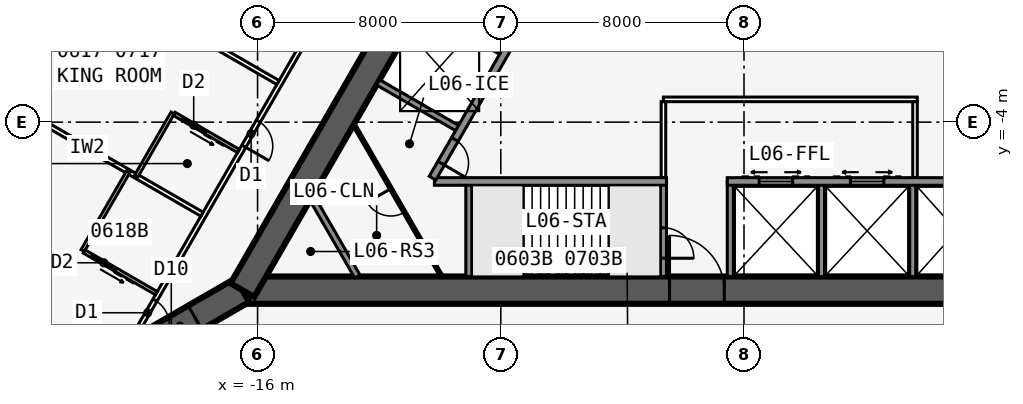
"""IFC4 building model, lengths in metres.
Left out: names, types, materials, properties, quantities, classifications, styles, units other than length and angle.
Written with IfcOpenShell. Run it as: python <this file> out.ifc"""

import sys

from ifc_helpers import new_model, si_unit, direction, frame, frame_2d, origin, place, context, subcontext, project, spatial, rectangle, extrude, element, fill, save


model = new_model("IFC4")
c1 = context("Model", 3, precision=1e-05, world=origin(), true_north=direction((0.0, 1.0)))
c2 = subcontext(c1, "Body", "Model", "MODEL_VIEW")
j1 = project(units=[si_unit("LENGTHUNIT", "METRE"), si_unit("PLANEANGLEUNIT", "RADIAN")], contexts=[c1])
p1 = place(None, origin())
s1 = spatial("IfcSite", under=j1, at=p1, CompositionType="ELEMENT")
p2 = place(p1, origin())
s2 = spatial("IfcBuilding", under=s1, at=p2, CompositionType="ELEMENT")
p3 = place(p2, frame((0.0, 0.0, 31.9)))
s3 = spatial("IfcBuildingStorey", under=s2, at=p3, CompositionType="ELEMENT", Elevation=31.9)
p4 = place(p3, frame((-16.5, -9.526, 0.0), z_axis=(0.0, 0.0, 1.0), x_axis=(1.0, 0.0, 0.0)))
e1 = element("IfcWall", 1, at=p4, inside=s3, PredefinedType="SHEAR", context=c2, shape_type="SweptSolid", body=[
    extrude(rectangle(XDim=33.0, YDim=0.9, at=frame_2d((16.5, 0.0))), origin(), (0.0, 0.0, 1.0), 3.4),
])
p5 = place(p4, frame((14.05, 0.0, 0.0)))
e2 = element("IfcOpeningElement", 2, at=p5, cuts=e1, PredefinedType="OPENING", context=c2, shape_type="SweptSolid", body=[
    extrude(rectangle(XDim=1.8, YDim=2.13, at=frame_2d((0.9, 1.065))), frame((0.0, 0.46, 0.0), z_axis=(0.0, -1.0, 0.0), x_axis=(1.0, 0.0, 0.0)), (0.0, 0.0, 1.0), 0.92),
])
p6 = place(p3, frame((-10.183, -5.951, 0.0), z_axis=(0.0, 0.0, 1.0), x_axis=(1.0, 0.0, 0.0)))
e3 = element("IfcWall", 3, at=p6, inside=s3, PredefinedType="SOLIDWALL", context=c2, shape_type="SweptSolid", body=[
    extrude(rectangle(XDim=7.633, YDim=0.25, at=frame_2d((3.816, 0.0))), origin(), (0.0, 0.0, 1.0), 3.235),
])
p7 = place(p3, frame((-0.55, -5.951, 0.0), z_axis=(0.0, 0.0, 1.0), x_axis=(1.0, 0.0, 0.0)))
e4 = element("IfcWall", 4, at=p7, inside=s3, PredefinedType="SOLIDWALL", context=c2, shape_type="SweptSolid", body=[
    extrude(rectangle(XDim=10.733, YDim=0.25, at=frame_2d((5.366, 0.0))), origin(), (0.0, 0.0, 1.0), 3.235),
])
p8 = place(p7, frame((9.314, 0.0, 0.0)))
e5 = element("IfcOpeningElement", 5, at=p8, cuts=e4, PredefinedType="OPENING", context=c2, shape_type="SweptSolid", body=[
    extrude(rectangle(XDim=0.9, YDim=2.13, at=frame_2d((0.45, 1.065))), frame((0.0, 0.135, 0.0), z_axis=(0.0, -1.0, 0.0), x_axis=(1.0, 0.0, 0.0)), (0.0, 0.0, 1.0), 0.27),
])
p9 = place(p7, frame((1.05, 0.0, 0.0)))
e6 = element("IfcOpeningElement", 6, at=p9, cuts=e4, PredefinedType="OPENING", context=c2, shape_type="SweptSolid", body=[
    extrude(rectangle(XDim=1.1, YDim=2.13, at=frame_2d((0.55, 1.065))), frame((0.0, 0.135, 0.0), z_axis=(0.0, -1.0, 0.0), x_axis=(1.0, 0.0, 0.0)), (0.0, 0.0, 1.0), 0.27),
])
p10 = place(p7, frame((4.05, 0.0, 0.0)))
e7 = element("IfcOpeningElement", 7, at=p10, cuts=e4, PredefinedType="OPENING", context=c2, shape_type="SweptSolid", body=[
    extrude(rectangle(XDim=1.1, YDim=2.13, at=frame_2d((0.55, 1.065))), frame((0.0, 0.135, 0.0), z_axis=(0.0, -1.0, 0.0), x_axis=(1.0, 0.0, 0.0)), (0.0, 0.0, 1.0), 0.27),
])
p11 = place(p3, frame((-9.05, -5.951, 0.0), z_axis=(0.0, 0.0, 1.0), x_axis=(0.0, -1.0, 0.0)))
e8 = element("IfcWall", 8, at=p11, inside=s3, PredefinedType="SOLIDWALL", context=c2, shape_type="SweptSolid", body=[
    extrude(rectangle(XDim=3.125, YDim=0.2, at=frame_2d((1.562, 0.0))), origin(), (0.0, 0.0, 1.0), 3.235),
])
p12 = place(p3, frame((-2.65, -5.951, 0.0), z_axis=(0.0, 0.0, 1.0), x_axis=(0.0, -1.0, 0.0)))
e9 = element("IfcWall", 9, at=p12, inside=s3, PredefinedType="SOLIDWALL", context=c2, shape_type="SweptSolid", body=[
    extrude(rectangle(XDim=3.125, YDim=0.2, at=frame_2d((1.562, 0.0))), origin(), (0.0, 0.0, 1.0), 3.235),
])
p13 = place(p12, frame((1.525, 0.0, 0.0)))
e10 = element("IfcOpeningElement", 10, at=p13, cuts=e9, PredefinedType="OPENING", context=c2, shape_type="SweptSolid", body=[
    extrude(rectangle(XDim=1.0, YDim=2.13, at=frame_2d((0.5, 1.065))), frame((0.0, 0.11, 0.0), z_axis=(0.0, -1.0, 0.0), x_axis=(1.0, 0.0, 0.0)), (0.0, 0.0, 1.0), 0.22),
])
for number, where, z_axis, x_axis in (
    (11, (-0.45, -5.951, 0.0), (0.0, 0.0, 1.0), (0.0, -1.0, 0.0)),
    (12, (2.55, -5.951, 0.0), (0.0, 0.0, 1.0), (0.0, -1.0, 0.0)),
    (13, (5.55, -5.951, 0.0), (0.0, 0.0, 1.0), (0.0, -1.0, 0.0)),
):
    element("IfcWall", number, at=place(p3, frame(where, z_axis=z_axis, x_axis=x_axis)), inside=s3, PredefinedType="SOLIDWALL", context=c2, shape_type="SweptSolid", body=[
        extrude(rectangle(XDim=3.125, YDim=0.2, at=frame_2d((1.562, 0.0))), origin(), (0.0, 0.0, 1.0), 3.235),
    ])
p14 = place(p3, frame((16.5, -9.526, 0.0), z_axis=(0.0, 0.0, 1.0), x_axis=(-0.499999749417, 0.866025548458, 0.0)))
e14 = element("IfcWall", 14, at=p14, inside=s3, PredefinedType="SHEAR", context=c2, shape_type="SweptSolid", body=[
    extrude(rectangle(XDim=33.0, YDim=0.9, at=frame_2d((16.5, 0.0))), origin(), (0.0, 0.0, 1.0), 3.4),
])
p15 = place(p14, frame((14.15, 0.0, 0.0)))
e15 = element("IfcOpeningElement", 15, at=p15, cuts=e14, PredefinedType="OPENING", context=c2, shape_type="SweptSolid", body=[
    extrude(rectangle(XDim=1.8, YDim=2.13, at=frame_2d((0.9, 1.065))), frame((0.0, 0.46, 0.0), z_axis=(0.0, -1.0, 0.0), x_axis=(1.0, 0.0, 0.0)), (0.0, 0.0, 1.0), 0.92),
])
p16 = place(p14, frame((12.6, 0.0, 0.0)))
e16 = element("IfcOpeningElement", 16, at=p16, cuts=e14, PredefinedType="OPENING", context=c2, shape_type="SweptSolid", body=[
    extrude(rectangle(XDim=1.0, YDim=2.13, at=frame_2d((0.5, 1.065))), frame((0.0, 0.46, 0.0), z_axis=(0.0, -1.0, 0.0), x_axis=(1.0, 0.0, 0.0)), (0.0, 0.0, 1.0), 0.92),
])
p17 = place(p3, frame((10.245, -5.843, 0.0), z_axis=(0.0, 0.0, 1.0), x_axis=(-0.499993009313, 0.866029439822, 0.0)))
e17 = element("IfcWall", 17, at=p17, inside=s3, PredefinedType="SOLIDWALL", context=c2, shape_type="SweptSolid", body=[
    extrude(rectangle(XDim=7.733, YDim=0.25, at=frame_2d((3.866, 0.0))), origin(), (0.0, 0.0, 1.0), 3.235),
])
p18 = place(p3, frame((0.0, 19.052, 0.0), z_axis=(0.0, 0.0, 1.0), x_axis=(-0.499999749417, -0.866025548458, 0.0)))
e18 = element("IfcWall", 18, at=p18, inside=s3, PredefinedType="SHEAR", context=c2, shape_type="SweptSolid", body=[
    extrude(rectangle(XDim=33.0, YDim=0.9, at=frame_2d((16.5, 0.0))), origin(), (0.0, 0.0, 1.0), 3.4),
])
p19 = place(p18, frame((14.15, 0.0, 0.0)))
e19 = element("IfcOpeningElement", 19, at=p19, cuts=e18, PredefinedType="OPENING", context=c2, shape_type="SweptSolid", body=[
    extrude(rectangle(XDim=1.8, YDim=2.13, at=frame_2d((0.9, 1.065))), frame((0.0, 0.46, 0.0), z_axis=(0.0, -1.0, 0.0), x_axis=(1.0, 0.0, 0.0)), (0.0, 0.0, 1.0), 0.92),
])
p20 = place(p18, frame((12.6, 0.0, 0.0)))
e20 = element("IfcOpeningElement", 20, at=p20, cuts=e18, PredefinedType="OPENING", context=c2, shape_type="SweptSolid", body=[
    extrude(rectangle(XDim=1.0, YDim=2.13, at=frame_2d((0.5, 1.065))), frame((0.0, 0.46, 0.0), z_axis=(0.0, -1.0, 0.0), x_axis=(1.0, 0.0, 0.0)), (0.0, 0.0, 1.0), 0.92),
])
p21 = place(p3, frame((-4.929, 3.365, 0.0), z_axis=(0.0, 0.0, 1.0), x_axis=(-0.499991433582, -0.866030349552, 0.0)))
e21 = element("IfcWall", 21, at=p21, inside=s3, PredefinedType="SOLIDWALL", context=c2, shape_type="SweptSolid", body=[
    extrude(rectangle(XDim=10.633, YDim=0.25, at=frame_2d((5.316, 0.0))), origin(), (0.0, 0.0, 1.0), 3.235),
])
p22 = place(p21, frame((9.164, 0.0, 0.0)))
e22 = element("IfcOpeningElement", 22, at=p22, cuts=e21, PredefinedType="OPENING", context=c2, shape_type="SweptSolid", body=[
    extrude(rectangle(XDim=0.9, YDim=2.13, at=frame_2d((0.45, 1.065))), frame((0.0, 0.135, 0.0), z_axis=(0.0, -1.0, 0.0), x_axis=(1.0, 0.0, 0.0)), (0.0, 0.0, 1.0), 0.27),
])
for number, where, z_axis, x_axis in (
    (23, (-7.879, -1.744, 0.0), (0.0, 0.0, 1.0), (-0.866, 0.5, 0.0)),
    (24, (-9.329, -4.256, 0.0), (0.0, 0.0, 1.0), (-0.866, 0.5, 0.0)),
):
    element("IfcWall", number, at=place(p3, frame(where, z_axis=z_axis, x_axis=x_axis)), inside=s3, PredefinedType="SOLIDWALL", context=c2, shape_type="SweptSolid", body=[
        extrude(rectangle(XDim=3.125, YDim=0.2, at=frame_2d((1.562, 0.0))), origin(), (0.0, 0.0, 1.0), 3.235),
    ])
p23 = place(p3, frame((-16.5, -9.526, 0.0), z_axis=(0.0, 0.0, 1.0), x_axis=(-0.866031398331, -0.499989616998, 0.0)))
e25 = element("IfcWall", 25, at=p23, inside=s3, PredefinedType="SHEAR", context=c2, shape_type="SweptSolid", body=[
    extrude(rectangle(XDim=4.746, YDim=0.9, at=frame_2d((2.373, 0.0))), origin(), (0.0, 0.0, 1.0), 3.4),
])
p24 = place(p23, frame((1.8, 0.0, 0.0)))
e26 = element("IfcOpeningElement", 26, at=p24, cuts=e25, PredefinedType="OPENING", context=c2, shape_type="SweptSolid", body=[
    extrude(rectangle(XDim=1.8, YDim=2.13, at=frame_2d((0.9, 1.065))), frame((0.0, 0.46, 0.0), z_axis=(0.0, -1.0, 0.0), x_axis=(1.0, 0.0, 0.0)), (0.0, 0.0, 1.0), 0.92),
])
p25 = place(p3, frame((20.027, -10.985, 0.0), z_axis=(0.0, 0.0, 1.0), x_axis=(-0.500001677587, 0.866024435227, 0.0)))
e27 = element("IfcWall", 27, at=p25, inside=s3, PredefinedType="PARTITIONING", context=c2, shape_type="SweptSolid", body=[
    extrude(rectangle(XDim=39.054, YDim=0.15, at=frame_2d((19.527, 0.0))), origin(), (0.0, 0.0, 1.0), 3.235),
])
p26 = place(p25, frame((0.352, 0.0, 0.0)))
e28 = element("IfcOpeningElement", 28, at=p26, cuts=e27, PredefinedType="OPENING", context=c2, shape_type="SweptSolid", body=[
    extrude(rectangle(XDim=0.95, YDim=2.13, at=frame_2d((0.475, 1.065))), frame((0.0, 0.085, 0.0), z_axis=(0.0, -1.0, 0.0), x_axis=(1.0, 0.0, 0.0)), (0.0, 0.0, 1.0), 0.17),
])
p27 = place(p25, frame((5.952, 0.0, 0.0)))
e29 = element("IfcOpeningElement", 29, at=p27, cuts=e27, PredefinedType="OPENING", context=c2, shape_type="SweptSolid", body=[
    extrude(rectangle(XDim=0.95, YDim=2.13, at=frame_2d((0.475, 1.065))), frame((0.0, 0.085, 0.0), z_axis=(0.0, -1.0, 0.0), x_axis=(1.0, 0.0, 0.0)), (0.0, 0.0, 1.0), 0.17),
])
p28 = place(p25, frame((12.152, 0.0, 0.0)))
e30 = element("IfcOpeningElement", 30, at=p28, cuts=e27, PredefinedType="OPENING", context=c2, shape_type="SweptSolid", body=[
    extrude(rectangle(XDim=0.95, YDim=2.13, at=frame_2d((0.475, 1.065))), frame((0.0, 0.085, 0.0), z_axis=(0.0, -1.0, 0.0), x_axis=(1.0, 0.0, 0.0)), (0.0, 0.0, 1.0), 0.17),
])
p29 = place(p25, frame((15.952, 0.0, 0.0)))
e31 = element("IfcOpeningElement", 31, at=p29, cuts=e27, PredefinedType="OPENING", context=c2, shape_type="SweptSolid", body=[
    extrude(rectangle(XDim=0.95, YDim=2.13, at=frame_2d((0.475, 1.065))), frame((0.0, 0.085, 0.0), z_axis=(0.0, -1.0, 0.0), x_axis=(1.0, 0.0, 0.0)), (0.0, 0.0, 1.0), 0.17),
])
p30 = place(p25, frame((22.152, 0.0, 0.0)))
e32 = element("IfcOpeningElement", 32, at=p30, cuts=e27, PredefinedType="OPENING", context=c2, shape_type="SweptSolid", body=[
    extrude(rectangle(XDim=0.95, YDim=2.13, at=frame_2d((0.475, 1.065))), frame((0.0, 0.085, 0.0), z_axis=(0.0, -1.0, 0.0), x_axis=(1.0, 0.0, 0.0)), (0.0, 0.0, 1.0), 0.17),
])
p31 = place(p25, frame((25.952, 0.0, 0.0)))
e33 = element("IfcOpeningElement", 33, at=p31, cuts=e27, PredefinedType="OPENING", context=c2, shape_type="SweptSolid", body=[
    extrude(rectangle(XDim=0.95, YDim=2.13, at=frame_2d((0.475, 1.065))), frame((0.0, 0.085, 0.0), z_axis=(0.0, -1.0, 0.0), x_axis=(1.0, 0.0, 0.0)), (0.0, 0.0, 1.0), 0.17),
])
p32 = place(p25, frame((36.546, 0.0, 0.0)))
e34 = element("IfcOpeningElement", 34, at=p32, cuts=e27, PredefinedType="OPENING", context=c2, shape_type="SweptSolid", body=[
    extrude(rectangle(XDim=0.95, YDim=2.13, at=frame_2d((0.475, 1.065))), frame((0.0, 0.085, 0.0), z_axis=(0.0, -1.0, 0.0), x_axis=(1.0, 0.0, 0.0)), (0.0, 0.0, 1.0), 0.17),
])
p33 = place(p3, frame((-0.5, 22.836, 0.0), z_axis=(0.0, 0.0, 1.0), x_axis=(-0.500001677587, -0.866024435227, 0.0)))
e35 = element("IfcWall", 35, at=p33, inside=s3, PredefinedType="PARTITIONING", context=c2, shape_type="SweptSolid", body=[
    extrude(rectangle(XDim=39.054, YDim=0.15, at=frame_2d((19.527, 0.0))), origin(), (0.0, 0.0, 1.0), 3.235),
])
p34 = place(p33, frame((1.558, 0.0, 0.0)))
e36 = element("IfcOpeningElement", 36, at=p34, cuts=e35, PredefinedType="OPENING", context=c2, shape_type="SweptSolid", body=[
    extrude(rectangle(XDim=0.95, YDim=2.13, at=frame_2d((0.475, 1.065))), frame((0.0, 0.085, 0.0), z_axis=(0.0, -1.0, 0.0), x_axis=(1.0, 0.0, 0.0)), (0.0, 0.0, 1.0), 0.17),
])
p35 = place(p33, frame((15.352, 0.0, 0.0)))
e37 = element("IfcOpeningElement", 37, at=p35, cuts=e35, PredefinedType="OPENING", context=c2, shape_type="SweptSolid", body=[
    extrude(rectangle(XDim=0.95, YDim=2.13, at=frame_2d((0.475, 1.065))), frame((0.0, 0.085, 0.0), z_axis=(0.0, -1.0, 0.0), x_axis=(1.0, 0.0, 0.0)), (0.0, 0.0, 1.0), 0.17),
])
p36 = place(p33, frame((22.752, 0.0, 0.0)))
e38 = element("IfcOpeningElement", 38, at=p36, cuts=e35, PredefinedType="OPENING", context=c2, shape_type="SweptSolid", body=[
    extrude(rectangle(XDim=0.95, YDim=2.13, at=frame_2d((0.475, 1.065))), frame((0.0, 0.085, 0.0), z_axis=(0.0, -1.0, 0.0), x_axis=(1.0, 0.0, 0.0)), (0.0, 0.0, 1.0), 0.17),
])
p37 = place(p33, frame((30.952, 0.0, 0.0)))
e39 = element("IfcOpeningElement", 39, at=p37, cuts=e35, PredefinedType="OPENING", context=c2, shape_type="SweptSolid", body=[
    extrude(rectangle(XDim=0.95, YDim=2.13, at=frame_2d((0.475, 1.065))), frame((0.0, 0.085, 0.0), z_axis=(0.0, -1.0, 0.0), x_axis=(1.0, 0.0, 0.0)), (0.0, 0.0, 1.0), 0.17),
])
p38 = place(p33, frame((37.752, 0.0, 0.0)))
e40 = element("IfcOpeningElement", 40, at=p38, cuts=e35, PredefinedType="OPENING", context=c2, shape_type="SweptSolid", body=[
    extrude(rectangle(XDim=0.95, YDim=2.13, at=frame_2d((0.475, 1.065))), frame((0.0, 0.085, 0.0), z_axis=(0.0, -1.0, 0.0), x_axis=(1.0, 0.0, 0.0)), (0.0, 0.0, 1.0), 0.17),
])
p39 = place(p3, frame((-15.329, -2.697, 0.0), z_axis=(0.0, 0.0, 1.0), x_axis=(-0.866018409083, 0.500012114982, 0.0)))
e41 = element("IfcWall", 41, at=p39, inside=s3, PredefinedType="PARTITIONING", context=c2, shape_type="SweptSolid", body=[
    extrude(rectangle(XDim=9.485, YDim=0.15, at=frame_2d((4.742, 0.0))), origin(), (0.0, 0.0, 1.0), 2.389),
])
p40 = place(p3, frame((-17.829, -7.027, 0.0), z_axis=(0.0, 0.0, 1.0), x_axis=(-0.866032659912, 0.499987431809, 0.0)))
e42 = element("IfcWall", 42, at=p40, inside=s3, PredefinedType="PARTITIONING", context=c2, shape_type="SweptSolid", body=[
    extrude(rectangle(XDim=8.72, YDim=0.15, at=frame_2d((4.36, 0.0))), origin(), (0.0, 0.0, 1.0), 2.389),
])
p41 = place(p3, frame((-18.793, -3.699, 0.0), z_axis=(0.0, 0.0, 1.0), x_axis=(-0.500001309137, -0.866024647952, 0.0)))
e43 = element("IfcWall", 43, at=p41, inside=s3, PredefinedType="PLUMBINGWALL", context=c2, shape_type="SweptSolid", body=[
    extrude(rectangle(XDim=2.4, YDim=0.12, at=frame_2d((1.2, 0.0))), origin(), (0.0, 0.0, 1.0), 3.235),
])
p42 = place(p3, frame((-16.628, -4.949, 0.0), z_axis=(0.0, 0.0, 1.0), x_axis=(-0.866048967903, 0.499959183527, 0.0)))
e44 = element("IfcWall", 44, at=p42, inside=s3, PredefinedType="PLUMBINGWALL", context=c2, shape_type="SweptSolid", body=[
    extrude(rectangle(XDim=2.44, YDim=0.12, at=frame_2d((1.22, 0.0))), origin(), (0.0, 0.0, 1.0), 3.235),
])
p43 = place(p42, frame((1.25, 0.0, 0.0)))
e45 = element("IfcOpeningElement", 45, at=p43, cuts=e44, PredefinedType="OPENING", context=c2, shape_type="SweptSolid", body=[
    extrude(rectangle(XDim=0.9, YDim=2.13, at=frame_2d((0.45, 1.065))), frame((0.0, 0.07, 0.0), z_axis=(0.0, -1.0, 0.0), x_axis=(1.0, 0.0, 0.0)), (0.0, 0.0, 1.0), 0.14),
])
p44 = place(p3, frame((-20.253, -5.627, 0.0), z_axis=(0.0, 0.0, 1.0), x_axis=(-0.499990139034, -0.866031096941, 0.0)))
e46 = element("IfcWall", 46, at=p44, inside=s3, PredefinedType="PLUMBINGWALL", context=c2, shape_type="SweptSolid", body=[
    extrude(rectangle(XDim=3.0, YDim=0.12, at=frame_2d((1.5, 0.0))), origin(), (0.0, 0.0, 1.0), 3.235),
])
p45 = place(p3, frame((-19.329, -9.625, 0.0), z_axis=(0.0, 0.0, 1.0), x_axis=(-0.866035715982, 0.499982138324, 0.0)))
e47 = element("IfcWall", 47, at=p45, inside=s3, PredefinedType="PLUMBINGWALL", context=c2, shape_type="SweptSolid", body=[
    extrude(rectangle(XDim=2.74, YDim=0.12, at=frame_2d((1.37, 0.0))), origin(), (0.0, 0.0, 1.0), 3.235),
])
p46 = place(p45, frame((1.55, 0.0, 0.0)))
e48 = element("IfcOpeningElement", 48, at=p46, cuts=e47, PredefinedType="OPENING", context=c2, shape_type="SweptSolid", body=[
    extrude(rectangle(XDim=0.9, YDim=2.13, at=frame_2d((0.45, 1.065))), frame((0.0, 0.07, 0.0), z_axis=(0.0, -1.0, 0.0), x_axis=(1.0, 0.0, 0.0)), (0.0, 0.0, 1.0), 0.14),
])
p47 = place(p3, frame((-2.65, -3.251, 0.0), z_axis=(0.0, 0.0, 1.0), x_axis=(1.0, 0.0, 0.0)))
e49 = element("IfcWall", 49, at=p47, inside=s3, PredefinedType="PARTITIONING", context=c2, shape_type="SweptSolid", body=[
    extrude(rectangle(XDim=8.35, YDim=0.15, at=frame_2d((4.175, 0.0))), origin(), (0.0, 0.0, 1.0), 3.235),
])
for number, where, z_axis, x_axis in (
    (50, (-2.65, -5.826, 0.0), (0.0, 0.0, 1.0), (0.0, 1.0, 0.0)),
    (51, (5.625, -5.826, 0.0), (0.0, 0.0, 1.0), (0.0, 1.0, 0.0)),
):
    element("IfcWall", number, at=place(p3, frame(where, z_axis=z_axis, x_axis=x_axis)), inside=s3, PredefinedType="PARTITIONING", context=c2, shape_type="SweptSolid", body=[
        extrude(rectangle(XDim=2.5, YDim=0.15, at=frame_2d((1.25, 0.0))), origin(), (0.0, 0.0, 1.0), 3.235),
    ])
p48 = place(p3, frame((-12.719, -9.076, 0.0), z_axis=(0.0, 0.0, 1.0), x_axis=(-0.499952404951, 0.866052881055, 0.0)))
e52 = element("IfcWall", 52, at=p48, inside=s3, PredefinedType="SOLIDWALL", context=c2, shape_type="SweptSolid", body=[
    extrude(rectangle(XDim=3.002, YDim=0.2, at=frame_2d((1.501, 0.0))), origin(), (0.0, 0.0, 1.0), 3.235),
])
p49 = place(p3, frame((-9.947, -9.076, 0.0), z_axis=(0.0, 0.0, 1.0), x_axis=(-0.500027479704, 0.866009537788, 0.0)))
e53 = element("IfcWall", 53, at=p49, inside=s3, PredefinedType="PARTITIONING", context=c2, shape_type="SweptSolid", body=[
    extrude(rectangle(XDim=5.774, YDim=0.1, at=frame_2d((2.887, 0.0))), origin(), (0.0, 0.0, 1.0), 3.235),
])
p50 = place(p49, frame((2.437, 0.0, 0.0)))
e54 = element("IfcOpeningElement", 54, at=p50, cuts=e53, PredefinedType="OPENING", context=c2, shape_type="SweptSolid", body=[
    extrude(rectangle(XDim=0.9, YDim=2.13, at=frame_2d((0.45, 1.065))), frame((0.0, 0.06, 0.0), z_axis=(0.0, -1.0, 0.0), x_axis=(1.0, 0.0, 0.0)), (0.0, 0.0, 1.0), 0.12),
])
p51 = place(p3, frame((-7.247, -7.576, 0.0), z_axis=(0.0, 0.0, 1.0), x_axis=(1.0, 0.0, 0.0)))
e55 = element("IfcWall", 55, at=p51, inside=s3, PredefinedType="SOLIDWALL", context=c2, shape_type="SweptSolid", body=[
    extrude(rectangle(XDim=2.794, YDim=0.1, at=frame_2d((1.397, 0.0))), origin(), (0.0, 0.0, 1.0), 3.4),
])
p52 = place(p43, origin())
e56 = element("IfcDoor", 56, at=p52, inside=s3, OperationType="SLIDING_TO_LEFT", PredefinedType="DOOR", context=c2, shape_type="SweptSolid", body=[
    extrude(rectangle(XDim=0.9, YDim=2.13, at=frame_2d((0.45, 1.065))), frame((0.0, 0.025, 0.0), z_axis=(0.0, -1.0, 0.0), x_axis=(1.0, 0.0, 0.0)), (0.0, 0.0, 1.0), 0.05),
])
fill(e45, e56)
p53 = place(p37, origin())
e57 = element("IfcDoor", 57, at=p53, inside=s3, OperationType="SINGLE_SWING_RIGHT", PredefinedType="DOOR", context=c2, shape_type="SweptSolid", body=[
    extrude(rectangle(XDim=0.95, YDim=2.13, at=frame_2d((0.475, 1.065))), frame((0.0, 0.025, 0.0), z_axis=(0.0, -1.0, 0.0), x_axis=(1.0, 0.0, 0.0)), (0.0, 0.0, 1.0), 0.05),
])
fill(e39, e57)
p54 = place(p46, origin())
e58 = element("IfcDoor", 58, at=p54, inside=s3, OperationType="SLIDING_TO_LEFT", PredefinedType="DOOR", context=c2, shape_type="SweptSolid", body=[
    extrude(rectangle(XDim=0.9, YDim=2.13, at=frame_2d((0.45, 1.065))), frame((0.0, 0.025, 0.0), z_axis=(0.0, -1.0, 0.0), x_axis=(1.0, 0.0, 0.0)), (0.0, 0.0, 1.0), 0.05),
])
fill(e48, e58)
p55 = place(p38, origin())
e59 = element("IfcDoor", 59, at=p55, inside=s3, OperationType="SINGLE_SWING_RIGHT", PredefinedType="DOOR", context=c2, shape_type="SweptSolid", body=[
    extrude(rectangle(XDim=0.95, YDim=2.13, at=frame_2d((0.475, 1.065))), frame((0.0, 0.025, 0.0), z_axis=(0.0, -1.0, 0.0), x_axis=(1.0, 0.0, 0.0)), (0.0, 0.0, 1.0), 0.05),
])
fill(e40, e59)
p56 = place(p5, origin())
e60 = element("IfcDoor", 60, at=p56, inside=s3, OperationType="DOUBLE_DOOR_SINGLE_SWING", PredefinedType="DOOR", context=c2, shape_type="SweptSolid", body=[
    extrude(rectangle(XDim=1.8, YDim=2.13, at=frame_2d((0.9, 1.065))), frame((0.0, 0.025, 0.0), z_axis=(0.0, -1.0, 0.0), x_axis=(1.0, 0.0, 0.0)), (0.0, 0.0, 1.0), 0.05),
])
fill(e2, e60)
p57 = place(p13, origin())
e61 = element("IfcDoor", 61, at=p57, inside=s3, OperationType="SINGLE_SWING_RIGHT", PredefinedType="DOOR", context=c2, shape_type="SweptSolid", body=[
    extrude(rectangle(XDim=1.0, YDim=2.13, at=frame_2d((0.5, 1.065))), frame((0.0, 0.025, 0.0), z_axis=(0.0, -1.0, 0.0), x_axis=(1.0, 0.0, 0.0)), (0.0, 0.0, 1.0), 0.05),
])
fill(e10, e61)
p58 = place(p24, origin())
e62 = element("IfcDoor", 62, at=p58, inside=s3, OperationType="DOUBLE_DOOR_DOUBLE_SWING", PredefinedType="DOOR", context=c2, shape_type="SweptSolid", body=[
    extrude(rectangle(XDim=1.8, YDim=2.13, at=frame_2d((0.9, 1.065))), frame((0.0, 0.025, 0.0), z_axis=(0.0, -1.0, 0.0), x_axis=(1.0, 0.0, 0.0)), (0.0, 0.0, 1.0), 0.05),
])
fill(e26, e62)
p59 = place(p50, origin())
e63 = element("IfcDoor", 63, at=p59, inside=s3, OperationType="SINGLE_SWING_RIGHT", PredefinedType="DOOR", context=c2, shape_type="SweptSolid", body=[
    extrude(rectangle(XDim=0.9, YDim=2.13, at=frame_2d((0.45, 1.065))), frame((0.0, 0.025, 0.0), z_axis=(0.0, -1.0, 0.0), x_axis=(1.0, 0.0, 0.0)), (0.0, 0.0, 1.0), 0.05),
])
fill(e54, e63)
p60 = place(p22, origin())
e64 = element("IfcDoor", 64, at=p60, inside=s3, OperationType="SINGLE_SWING_RIGHT", PredefinedType="DOOR", context=c2, shape_type="SweptSolid", body=[
    extrude(rectangle(XDim=0.9, YDim=2.13, at=frame_2d((0.45, 1.065))), frame((0.0, 0.025, 0.0), z_axis=(0.0, -1.0, 0.0), x_axis=(1.0, 0.0, 0.0)), (0.0, 0.0, 1.0), 0.05),
])
fill(e22, e64)
p61 = place(p9, origin())
e65 = element("IfcDoor", 65, at=p61, inside=s3, OperationType="DOUBLE_DOOR_SLIDING", PredefinedType="USERDEFINED", context=c2, shape_type="SweptSolid", body=[
    extrude(rectangle(XDim=1.1, YDim=2.13, at=frame_2d((0.55, 1.065))), frame((0.0, 0.025, 0.0), z_axis=(0.0, -1.0, 0.0), x_axis=(1.0, 0.0, 0.0)), (0.0, 0.0, 1.0), 0.05),
])
fill(e6, e65)
p62 = place(p10, origin())
e66 = element("IfcDoor", 66, at=p62, inside=s3, OperationType="DOUBLE_DOOR_SLIDING", PredefinedType="USERDEFINED", context=c2, shape_type="SweptSolid", body=[
    extrude(rectangle(XDim=1.1, YDim=2.13, at=frame_2d((0.55, 1.065))), frame((0.0, 0.025, 0.0), z_axis=(0.0, -1.0, 0.0), x_axis=(1.0, 0.0, 0.0)), (0.0, 0.0, 1.0), 0.05),
])
fill(e7, e66)
save(model, sys.argv[1])
